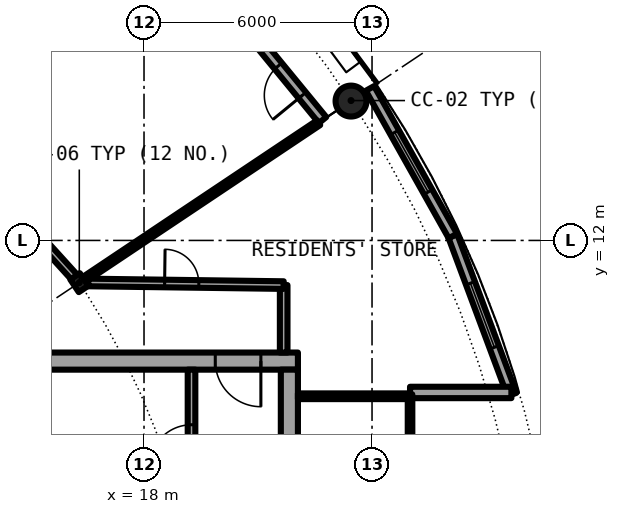
"""IFC4 building model, lengths in metres.
Left out: names, types, materials, properties, quantities, classifications, styles, units other than length and angle.
Written with IfcOpenShell. Run it as: python <this file> out.ifc"""

import sys

from ifc_helpers import new_model, si_unit, direction, frame, frame_2d, origin, origin_2d, place, context, subcontext, project, spatial, rectangle, hollow_circle, i_section, extrude, element, fill, save


model = new_model("IFC4")
c1 = context("Model", 3, precision=1e-05, world=origin(), true_north=direction((0.0, 1.0)))
c2 = subcontext(c1, "Body", "Model", "MODEL_VIEW")
j1 = project(units=[si_unit("LENGTHUNIT", "METRE"), si_unit("PLANEANGLEUNIT", "RADIAN")], contexts=[c1])
p1 = place(None, origin())
s1 = spatial("IfcSite", under=j1, at=p1, CompositionType="ELEMENT")
p2 = place(p1, origin())
s2 = spatial("IfcBuilding", under=s1, at=p2, CompositionType="ELEMENT")
p3 = place(p2, frame((0.0, 0.0, 208.5)))
s3 = spatial("IfcBuildingStorey", under=s2, at=p3, CompositionType="ELEMENT", Elevation=208.5)
p4 = place(p3, frame((23.448, 15.667, 0.0), z_axis=(0.0, 0.0, 1.0), x_axis=(1.0, 0.0, 0.0)))
e1 = element("IfcColumn", 1, at=p4, inside=s3, PredefinedType="COLUMN", context=c2, shape_type="SweptSolid", body=[
    extrude(hollow_circle(Radius=0.406, WallThickness=0.03, at=origin_2d()), origin(), (0.0, 0.0, 1.0), 4.2),
])
p5 = place(p3, frame((16.297, 10.889, 0.0), z_axis=(0.0, 0.0, 1.0), x_axis=(0.831469612303, 0.55557023302, 0.0)))
e2 = element("IfcColumn", 2, at=p5, inside=s3, PredefinedType="COLUMN", context=c2, shape_type="SweptSolid", body=[
    extrude(i_section(OverallWidth=0.3, OverallDepth=0.4, WebThickness=0.013, FlangeThickness=0.024, FilletRadius=0.027, at=origin_2d()), origin(), (0.0, 0.0, 1.0), 4.2),
])
p6 = place(p3, frame((22.699, 15.167, 0.0), z_axis=(0.0, 0.0, 1.0), x_axis=(-0.634382322723, 0.773019449054, 0.0)))
e3 = element("IfcWall", 3, at=p6, inside=s3, PredefinedType="SOLIDWALL", context=c2, shape_type="SweptSolid", body=[
    extrude(rectangle(XDim=5.352, YDim=0.25, at=frame_2d((2.676, 0.0))), origin(), (0.0, 0.0, 1.0), 3.85),
])
p7 = place(p6, frame((0.841, 0.0, 0.0)))
e4 = element("IfcOpeningElement", 4, at=p7, cuts=e3, PredefinedType="OPENING", context=c2, shape_type="SweptSolid", body=[
    extrude(rectangle(XDim=1.0, YDim=2.2, at=frame_2d((0.5, 1.1))), frame((0.0, 0.135, 0.0), z_axis=(0.0, -1.0, 0.0), x_axis=(1.0, 0.0, 0.0)), (0.0, 0.0, 1.0), 0.27),
])
p8 = place(p6, frame((3.51, 0.0, 0.0)))
e5 = element("IfcOpeningElement", 5, at=p8, cuts=e3, PredefinedType="OPENING", context=c2, shape_type="SweptSolid", body=[
    extrude(rectangle(XDim=1.0, YDim=2.2, at=frame_2d((0.5, 1.1))), frame((0.0, 0.135, 0.0), z_axis=(0.0, -1.0, 0.0), x_axis=(1.0, 0.0, 0.0)), (0.0, 0.0, 1.0), 0.27),
])
p9 = place(p3, frame((27.682, 7.945, 0.0), z_axis=(0.0, 0.0, 1.0), x_axis=(-0.349247811493, 0.937030397675, 0.0)))
e6 = element("IfcWall", 6, at=p9, inside=s3, PredefinedType="SOLIDWALL", context=c2, shape_type="SweptSolid", body=[
    extrude(rectangle(XDim=4.452, YDim=0.25, at=frame_2d((2.226, 0.0))), origin(), (0.0, 0.0, 1.0), 3.85),
])
p10 = place(p9, frame((1.327, 0.0, 0.3)))
e7 = element("IfcOpeningElement", 7, at=p10, cuts=e6, PredefinedType="OPENING", context=c2, shape_type="SweptSolid", body=[
    extrude(rectangle(XDim=1.8, YDim=2.1, at=frame_2d((0.9, 1.05))), frame((0.0, 0.135, 0.0), z_axis=(0.0, -1.0, 0.0), x_axis=(1.0, 0.0, 0.0)), (0.0, 0.0, 1.0), 0.27),
])
p11 = place(p3, frame((26.127, 12.117, 0.0), z_axis=(0.0, 0.0, 1.0), x_axis=(-0.489696356642, 0.871893042919, 0.0)))
e8 = element("IfcWall", 8, at=p11, inside=s3, PredefinedType="SOLIDWALL", context=c2, shape_type="SweptSolid", body=[
    extrude(rectangle(XDim=4.454, YDim=0.25, at=frame_2d((2.227, 0.0))), origin(), (0.0, 0.0, 1.0), 3.85),
])
p12 = place(p11, frame((1.327, 0.0, 0.3)))
e9 = element("IfcOpeningElement", 9, at=p12, cuts=e8, PredefinedType="OPENING", context=c2, shape_type="SweptSolid", body=[
    extrude(rectangle(XDim=1.8, YDim=2.1, at=frame_2d((0.9, 1.05))), frame((0.0, 0.135, 0.0), z_axis=(0.0, -1.0, 0.0), x_axis=(1.0, 0.0, 0.0)), (0.0, 0.0, 1.0), 0.27),
])
p13 = place(p3, frame((25.0, 8.0, 0.0), z_axis=(0.0, 0.0, 1.0), x_axis=(1.0, 0.0, 0.0)))
e10 = element("IfcWall", 10, at=p13, inside=s3, PredefinedType="SOLIDWALL", context=c2, shape_type="SweptSolid", body=[
    extrude(rectangle(XDim=2.667, YDim=0.3, at=frame_2d((1.333, 0.0))), origin(), (0.0, 0.0, 1.0), 3.85),
])
p14 = place(p3, frame((22.05, 8.825, 0.0), z_axis=(0.0, 0.0, 1.0), x_axis=(-1.0, 0.0, 0.0)))
e11 = element("IfcWall", 11, at=p14, inside=s3, PredefinedType="SHEAR", context=c2, shape_type="SweptSolid", body=[
    extrude(rectangle(XDim=13.5, YDim=0.45, at=frame_2d((6.75, 0.0))), origin(), (0.0, 0.0, 1.0), 4.2),
])
p15 = place(p14, frame((0.975, 0.0, 0.0)))
e12 = element("IfcOpeningElement", 12, at=p15, cuts=e11, PredefinedType="OPENING", context=c2, shape_type="SweptSolid", body=[
    extrude(rectangle(XDim=1.2, YDim=2.3, at=frame_2d((0.6, 1.15))), frame((0.0, 0.235, 0.0), z_axis=(0.0, -1.0, 0.0), x_axis=(1.0, 0.0, 0.0)), (0.0, 0.0, 1.0), 0.47),
])
p16 = place(p3, frame((21.825, 8.6, 0.0), z_axis=(0.0, 0.0, 1.0), x_axis=(0.0, -1.0, 0.0)))
e13 = element("IfcWall", 13, at=p16, inside=s3, PredefinedType="SHEAR", context=c2, shape_type="SweptSolid", body=[
    extrude(rectangle(XDim=17.2, YDim=0.45, at=frame_2d((8.6, 0.0))), origin(), (0.0, 0.0, 1.0), 4.2),
])
p17 = place(p16, frame((7.7, 0.0, 0.0)))
e14 = element("IfcOpeningElement", 14, at=p17, cuts=e13, PredefinedType="OPENING", context=c2, shape_type="SweptSolid", body=[
    extrude(rectangle(XDim=1.8, YDim=2.3, at=frame_2d((0.9, 1.15))), frame((0.0, 0.235, 0.0), z_axis=(0.0, -1.0, 0.0), x_axis=(1.0, 0.0, 0.0)), (0.0, 0.0, 1.0), 0.47),
])
p18 = place(p3, frame((19.25, 1.575, 0.0), z_axis=(0.0, 0.0, 1.0), x_axis=(0.0, 1.0, 0.0)))
e15 = element("IfcWall", 15, at=p18, inside=s3, PredefinedType="SOLIDWALL", context=c2, shape_type="SweptSolid", body=[
    extrude(rectangle(XDim=7.025, YDim=0.2, at=frame_2d((3.513, 0.0))), origin(), (0.0, 0.0, 1.0), 3.85),
])
p19 = place(p18, frame((4.475, 0.0, 0.0)))
e16 = element("IfcOpeningElement", 16, at=p19, cuts=e15, PredefinedType="OPENING", context=c2, shape_type="SweptSolid", body=[
    extrude(rectangle(XDim=1.1, YDim=2.3, at=frame_2d((0.55, 1.15))), frame((0.0, 0.11, 0.0), z_axis=(0.0, -1.0, 0.0), x_axis=(1.0, 0.0, 0.0)), (0.0, 0.0, 1.0), 0.22),
])
p20 = place(p3, frame((22.05, 7.9, 0.0), z_axis=(0.0, 0.0, 1.0), x_axis=(1.0, 0.0, 0.0)))
e17 = element("IfcWall", 17, at=p20, inside=s3, PredefinedType="PARTITIONING", context=c2, shape_type="SweptSolid", body=[
    extrude(rectangle(XDim=2.89, YDim=0.15, at=frame_2d((1.445, 0.0))), origin(), (0.0, 0.0, 1.0), 3.85),
])
p21 = place(p3, frame((25.0, -7.95, 0.0), z_axis=(0.0, 0.0, 1.0), x_axis=(0.0, 1.0, 0.0)))
e18 = element("IfcWall", 18, at=p21, inside=s3, PredefinedType="PARTITIONING", context=c2, shape_type="SweptSolid", body=[
    extrude(rectangle(XDim=15.9, YDim=0.12, at=frame_2d((7.95, 0.0))), origin(), (0.0, 0.0, 1.0), 3.85),
])
p22 = place(p21, frame((0.95, 0.0, 0.1)))
e19 = element("IfcOpeningElement", 19, at=p22, cuts=e18, PredefinedType="OPENING", context=c2, shape_type="SweptSolid", body=[
    extrude(rectangle(XDim=14.0, YDim=3.5, at=frame_2d((7.0, 1.75))), frame((0.0, 0.07, 0.0), z_axis=(0.0, -1.0, 0.0), x_axis=(1.0, 0.0, 0.0)), (0.0, 0.0, 1.0), 0.14),
])
p23 = place(p3, frame((21.675, 9.05, 0.0), z_axis=(0.0, 0.0, 1.0), x_axis=(0.0, 1.0, 0.0)))
e20 = element("IfcWall", 20, at=p23, inside=s3, PredefinedType="PARTITIONING", context=c2, shape_type="SweptSolid", body=[
    extrude(rectangle(XDim=1.775, YDim=0.2, at=frame_2d((0.887, 0.0))), origin(), (0.0, 0.0, 1.0), 3.85),
])
p24 = place(p3, frame((16.463, 11.0, 0.0), z_axis=(0.0, 0.0, 1.0), x_axis=(0.831433566583, 0.555624175463, 0.0)))
e21 = element("IfcWall", 21, at=p24, inside=s3, PredefinedType="PARTITIONING", context=c2, shape_type="SweptSolid", body=[
    extrude(rectangle(XDim=7.375, YDim=0.15, at=frame_2d((3.688, 0.0))), origin(), (0.0, 0.0, 1.0), 3.85),
])
p25 = place(p3, frame((16.534, 10.894, 0.0), z_axis=(0.0, 0.0, 1.0), x_axis=(0.999909707888, -0.013437859594, 0.0)))
e22 = element("IfcWall", 22, at=p25, inside=s3, PredefinedType="PARTITIONING", context=c2, shape_type="SweptSolid", body=[
    extrude(rectangle(XDim=5.142, YDim=0.2, at=frame_2d((2.571, 0.0))), origin(), (0.0, 0.0, 1.0), 3.85),
])
p26 = place(p25, frame((2.008, 0.0, 0.0)))
e23 = element("IfcOpeningElement", 23, at=p26, cuts=e22, PredefinedType="OPENING", context=c2, shape_type="SweptSolid", body=[
    extrude(rectangle(XDim=0.9, YDim=2.3, at=frame_2d((0.45, 1.15))), frame((0.0, 0.11, 0.0), z_axis=(0.0, -1.0, 0.0), x_axis=(1.0, 0.0, 0.0)), (0.0, 0.0, 1.0), 0.22),
])
p27 = place(p3, frame((12.434, 15.151, 0.0), z_axis=(0.0, 0.0, 1.0), x_axis=(0.671619657805, -0.740896102871, 0.0)))
e24 = element("IfcWall", 24, at=p27, inside=s3, PredefinedType="PARTITIONING", context=c2, shape_type="SweptSolid", body=[
    extrude(rectangle(XDim=5.6, YDim=0.2, at=frame_2d((2.8, 0.0))), origin(), (0.0, 0.0, 1.0), 3.6),
])
p28 = place(p7, origin())
e25 = element("IfcDoor", 25, at=p28, inside=s3, OperationType="SINGLE_SWING_LEFT", PredefinedType="DOOR", context=c2, shape_type="SweptSolid", body=[
    extrude(rectangle(XDim=1.0, YDim=2.2, at=frame_2d((0.5, 1.1))), frame((0.0, 0.025, 0.0), z_axis=(0.0, -1.0, 0.0), x_axis=(1.0, 0.0, 0.0)), (0.0, 0.0, 1.0), 0.05),
])
fill(e4, e25)
p29 = place(p10, origin())
e26 = element("IfcWindow", 26, at=p29, inside=s3, PartitioningType="SINGLE_PANEL", PredefinedType="WINDOW", context=c2, shape_type="SweptSolid", body=[
    extrude(rectangle(XDim=1.8, YDim=2.1, at=frame_2d((0.9, 1.05))), frame((0.0, 0.03, 0.0), z_axis=(0.0, -1.0, 0.0), x_axis=(1.0, 0.0, 0.0)), (0.0, 0.0, 1.0), 0.06),
])
fill(e7, e26)
p30 = place(p12, origin())
e27 = element("IfcWindow", 27, at=p30, inside=s3, PartitioningType="SINGLE_PANEL", PredefinedType="WINDOW", context=c2, shape_type="SweptSolid", body=[
    extrude(rectangle(XDim=1.8, YDim=2.1, at=frame_2d((0.9, 1.05))), frame((0.0, 0.03, 0.0), z_axis=(0.0, -1.0, 0.0), x_axis=(1.0, 0.0, 0.0)), (0.0, 0.0, 1.0), 0.06),
])
fill(e9, e27)
p31 = place(p19, origin())
e28 = element("IfcDoor", 28, at=p31, inside=s3, OperationType="SINGLE_SWING_LEFT", PredefinedType="DOOR", context=c2, shape_type="SweptSolid", body=[
    extrude(rectangle(XDim=1.1, YDim=2.3, at=frame_2d((0.55, 1.15))), frame((0.0, 0.025, 0.0), z_axis=(0.0, -1.0, 0.0), x_axis=(1.0, 0.0, 0.0)), (0.0, 0.0, 1.0), 0.05),
])
fill(e16, e28)
p32 = place(p15, origin())
e29 = element("IfcDoor", 29, at=p32, inside=s3, OperationType="SINGLE_SWING_RIGHT", PredefinedType="DOOR", context=c2, shape_type="SweptSolid", body=[
    extrude(rectangle(XDim=1.2, YDim=2.3, at=frame_2d((0.6, 1.15))), frame((0.0, 0.025, 0.0), z_axis=(0.0, -1.0, 0.0), x_axis=(1.0, 0.0, 0.0)), (0.0, 0.0, 1.0), 0.05),
])
fill(e12, e29)
p33 = place(p22, origin())
e30 = element("IfcWindow", 30, at=p33, inside=s3, PartitioningType="SINGLE_PANEL", PredefinedType="WINDOW", context=c2, shape_type="SweptSolid", body=[
    extrude(rectangle(XDim=14.0, YDim=3.5, at=frame_2d((7.0, 1.75))), frame((0.0, 0.03, 0.0), z_axis=(0.0, -1.0, 0.0), x_axis=(1.0, 0.0, 0.0)), (0.0, 0.0, 1.0), 0.06),
])
fill(e19, e30)
p34 = place(p26, origin())
e31 = element("IfcDoor", 31, at=p34, inside=s3, OperationType="SINGLE_SWING_LEFT", PredefinedType="DOOR", context=c2, shape_type="SweptSolid", body=[
    extrude(rectangle(XDim=0.9, YDim=2.3, at=frame_2d((0.45, 1.15))), frame((0.0, 0.025, 0.0), z_axis=(0.0, -1.0, 0.0), x_axis=(1.0, 0.0, 0.0)), (0.0, 0.0, 1.0), 0.05),
])
fill(e23, e31)
save(model, sys.argv[1])
